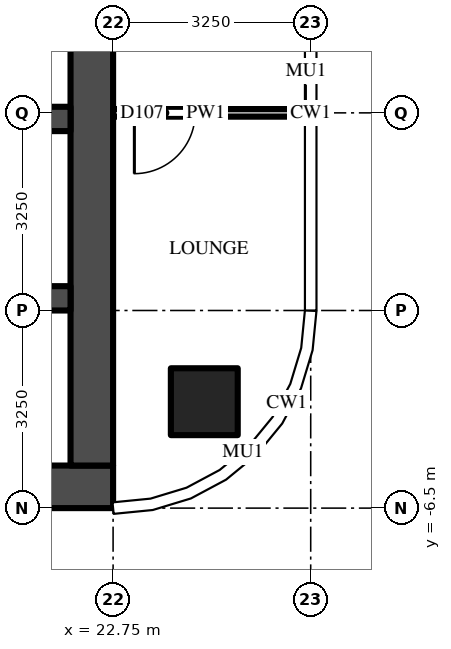
"""IFC4 building model, lengths in metres.
Left out: names, types, materials, properties, quantities, classifications, styles, units other than length and angle.
Written with IfcOpenShell. Run it as: python <this file> out.ifc"""

import sys

from ifc_helpers import new_model, si_unit, direction, frame, frame_2d, origin, origin_2d, place, context, subcontext, project, spatial, rectangle, extrude, source, transform, mapped, element, fill, save


model = new_model("IFC4")
c1 = context("Model", 3, precision=1e-05, world=origin(), true_north=direction((0.0, 1.0)))
c2 = subcontext(c1, "Body", "Model", "MODEL_VIEW")
j1 = project(units=[si_unit("LENGTHUNIT", "METRE"), si_unit("PLANEANGLEUNIT", "RADIAN")], contexts=[c1])
p1 = place(None, origin())
s1 = spatial("IfcSite", under=j1, at=p1, CompositionType="ELEMENT")
p2 = place(p1, origin())
s2 = spatial("IfcBuilding", under=s1, at=p2, CompositionType="ELEMENT")
p3 = place(p2, frame((0.0, 0.0, 240.2)))
s3 = spatial("IfcBuildingStorey", under=s2, at=p3, CompositionType="ELEMENT", Elevation=240.2)
m1 = source(origin(), c2, "Body", "SweptSolid", [
    extrude(rectangle(XDim=1.1, YDim=1.1, at=origin_2d()), origin(), (0.0, 0.0, 1.0), 3.9),
])
p4 = place(p3, frame((24.25, -4.75, 0.0), z_axis=(0.0, 0.0, 1.0), x_axis=(1.0, 0.0, 0.0)))
e1 = element("IfcColumn", 1, at=p4, inside=s3, PredefinedType="COLUMN", context=c2, shape_type="MappedRepresentation", body=[
    mapped(m1, transform((0.0, 0.0, 0.0))),
])
m2 = source(origin(), c2, "Body", "SweptSolid", [
    extrude(rectangle(XDim=16.6, YDim=0.7, at=frame_2d((8.3, 0.0))), origin(), (0.0, 0.0, 1.0), 3.7),
])
p5 = place(p3, frame((6.15, -6.15, 0.0), z_axis=(0.0, 0.0, 1.0), x_axis=(1.0, 0.0, 0.0)))
e2 = element("IfcWall", 2, at=p5, inside=s3, PredefinedType="SHEAR", context=c2, shape_type="MappedRepresentation", body=[
    mapped(m2, transform((0.0, 0.0, 0.0))),
])
m3 = source(origin(), c2, "Body", "SweptSolid", [
    extrude(rectangle(XDim=9.05, YDim=0.7, at=frame_2d((4.525, 0.0))), origin(), (0.0, 0.0, 1.0), 3.7),
])
p6 = place(p3, frame((22.4, -5.8, 0.0), z_axis=(0.0, 0.0, 1.0), x_axis=(0.0, 1.0, 0.0)))
e3 = element("IfcWall", 3, at=p6, inside=s3, PredefinedType="SHEAR", context=c2, shape_type="MappedRepresentation", body=[
    mapped(m3, transform((0.0, 0.0, 0.0))),
])
m4 = source(origin(), c2, "Body", "SweptSolid", [
    extrude(rectangle(XDim=14.85, YDim=0.4, at=frame_2d((7.425, 0.0))), origin(), (0.0, 0.0, 1.0), 3.7),
])
p7 = place(p3, frame((7.2, -0.1, 0.0), z_axis=(0.0, 0.0, 1.0), x_axis=(1.0, 0.0, 0.0)))
e4 = element("IfcWall", 4, at=p7, inside=s3, PredefinedType="SHEAR", context=c2, shape_type="MappedRepresentation", body=[
    mapped(m4, transform((0.0, 0.0, 0.0))),
])
m5 = source(origin(), c2, "Body", "SweptSolid", [
    extrude(rectangle(XDim=1.0, YDim=2.1, at=frame_2d((0.5, 1.05))), frame((0.0, 0.21, 0.0), z_axis=(0.0, -1.0, 0.0), x_axis=(1.0, 0.0, 0.0)), (0.0, 0.0, 1.0), 0.42),
])
p8 = place(p7, frame((7.9, 0.0, 0.0)))
e5 = element("IfcOpeningElement", 5, at=p8, cuts=e4, PredefinedType="OPENING", context=c2, shape_type="MappedRepresentation", body=[
    mapped(m5, transform((0.0, 0.0, 0.0))),
])
m6 = source(origin(), c2, "Body", "SweptSolid", [
    extrude(rectangle(XDim=5.7, YDim=0.4, at=frame_2d((2.85, 0.0))), origin(), (0.0, 0.0, 1.0), 3.7),
])
p9 = place(p3, frame((16.35, -3.05, 0.0), z_axis=(0.0, 0.0, 1.0), x_axis=(1.0, 0.0, 0.0)))
e6 = element("IfcWall", 6, at=p9, inside=s3, PredefinedType="SHEAR", context=c2, shape_type="MappedRepresentation", body=[
    mapped(m6, transform((0.0, 0.0, 0.0))),
])
m7 = source(origin(), c2, "Body", "SweptSolid", [
    extrude(rectangle(XDim=3.05, YDim=0.125, at=frame_2d((1.525, 0.0))), origin(), (0.0, 0.0, 1.0), 2.78),
])
p10 = place(p3, frame((25.8, 0.0, 0.0), z_axis=(0.0, 0.0, 1.0), x_axis=(-1.0, 0.0, 0.0)))
e7 = element("IfcWall", 7, at=p10, inside=s3, PredefinedType="PARTITIONING", context=c2, shape_type="MappedRepresentation", body=[
    mapped(m7, transform((0.0, 0.0, 0.0))),
])
m8 = source(origin(), c2, "Body", "SweptSolid", [
    extrude(rectangle(XDim=1.0, YDim=2.1, at=frame_2d((0.5, 1.05))), frame((0.0, 0.073, 0.0), z_axis=(0.0, -1.0, 0.0), x_axis=(1.0, 0.0, 0.0)), (0.0, 0.0, 1.0), 0.145),
])
p11 = place(p10, frame((1.7, 0.0, 0.0)))
e8 = element("IfcOpeningElement", 8, at=p11, cuts=e7, PredefinedType="OPENING", context=c2, shape_type="MappedRepresentation", body=[
    mapped(m8, transform((0.0, 0.0, 0.0))),
])
m9 = source(origin(), c2, "Body", "SweptSolid", [
    extrude(rectangle(XDim=1.0, YDim=2.1, at=frame_2d((0.5, 1.05))), frame((0.0, 0.025, 0.0), z_axis=(0.0, -1.0, 0.0), x_axis=(1.0, 0.0, 0.0)), (0.0, 0.0, 1.0), 0.05),
])
p12 = place(p11, origin())
e9 = element("IfcDoor", 9, at=p12, inside=s3, OperationType="SINGLE_SWING_RIGHT", PredefinedType="DOOR", context=c2, shape_type="MappedRepresentation", body=[
    mapped(m9, transform((0.0, 0.0, 0.0))),
])
fill(e8, e9)
save(model, sys.argv[1])
